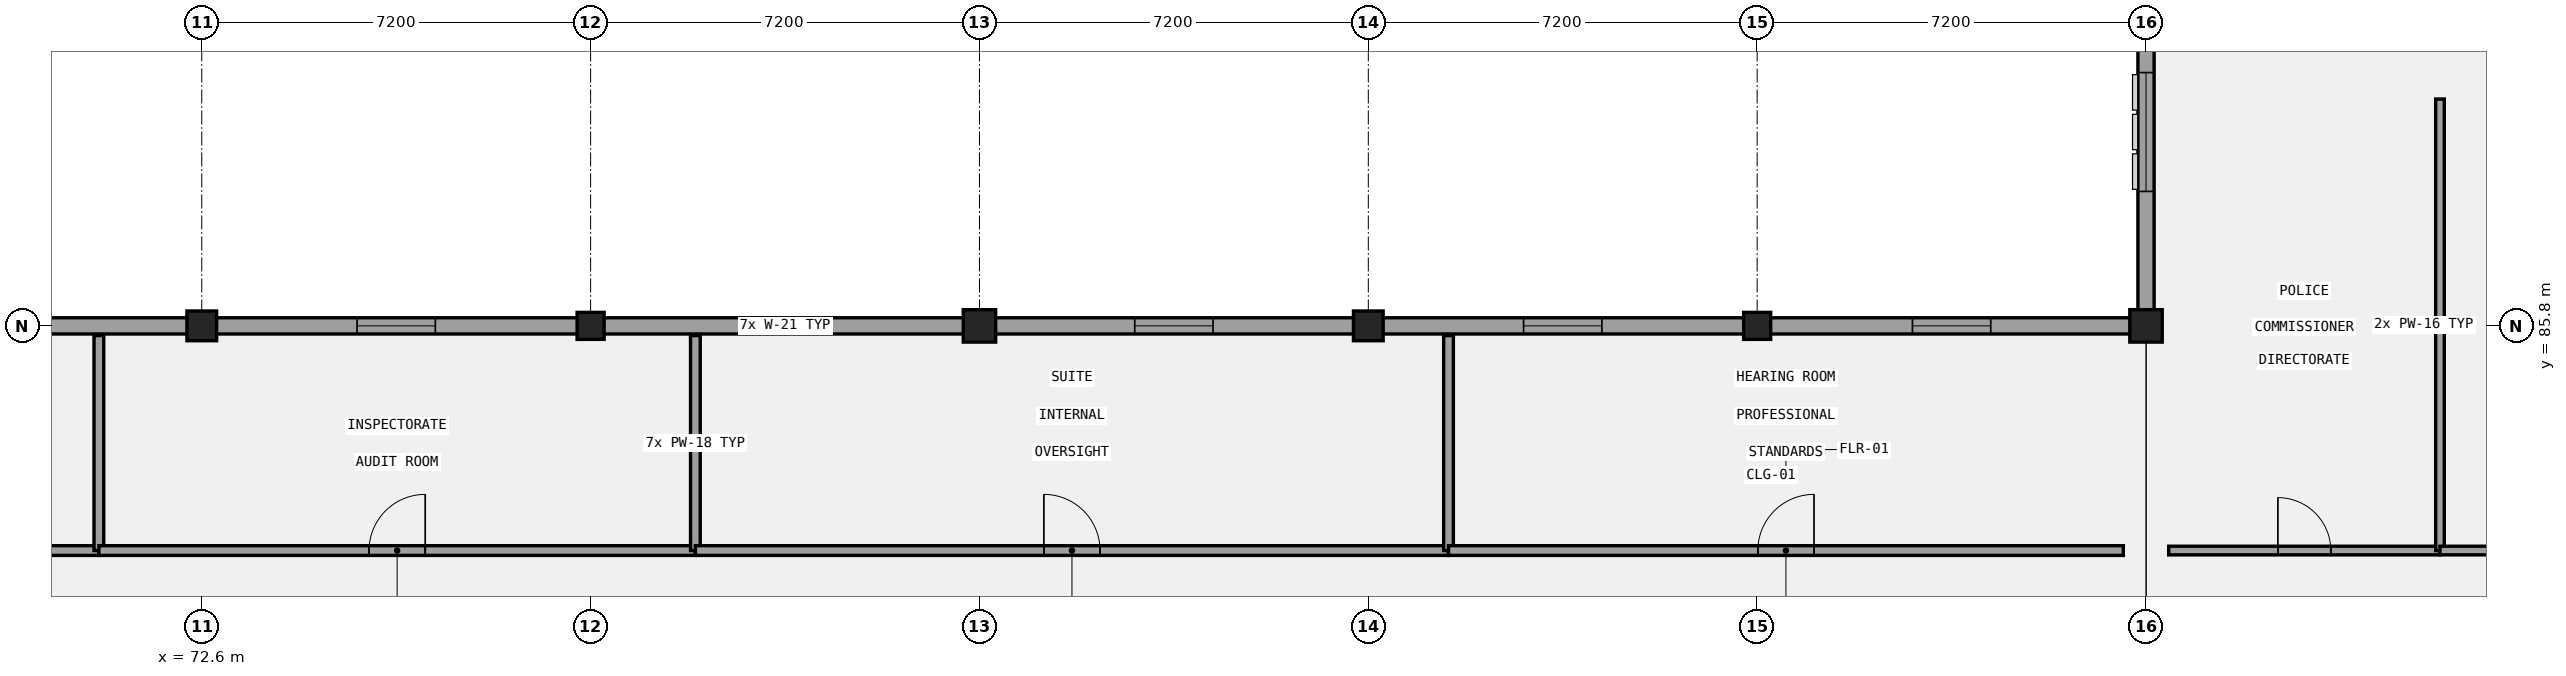
"""IFC4 building model, lengths in metres.
Left out: names, types, materials, properties, quantities, classifications, styles, units other than length and angle.
Written with IfcOpenShell. Run it as: python <this file> out.ifc"""

import sys

from ifc_helpers import new_model, si_unit, direction, frame, frame_2d, origin, origin_2d, place, context, subcontext, project, spatial, rectangle, extrude, element, fill, save


model = new_model("IFC4")
c1 = context("Model", 3, precision=1e-05, world=origin(), true_north=direction((0.0, 1.0)))
c2 = subcontext(c1, "Body", "Model", "MODEL_VIEW")
j1 = project(units=[si_unit("LENGTHUNIT", "METRE"), si_unit("PLANEANGLEUNIT", "RADIAN")], contexts=[c1])
p1 = place(None, origin())
s1 = spatial("IfcSite", under=j1, at=p1, CompositionType="ELEMENT")
p2 = place(p1, origin())
s2 = spatial("IfcBuilding", under=s1, at=p2, CompositionType="ELEMENT")
p3 = place(p2, frame((0.0, 0.0, 22.2)))
s3 = spatial("IfcBuildingStorey", under=s2, at=p3, CompositionType="ELEMENT", Elevation=22.2)
p4 = place(p3, frame((72.6, 85.8, 0.0), z_axis=(0.0, 0.0, 1.0), x_axis=(1.0, 0.0, 0.0)))
e1 = element("IfcColumn", 1, at=p4, inside=s3, PredefinedType="COLUMN", context=c2, shape_type="SweptSolid", body=[
    extrude(rectangle(XDim=0.55, YDim=0.55, at=origin_2d()), origin(), (0.0, 0.0, 1.0), 4.2),
])
p5 = place(p3, frame((79.8, 85.8, 0.0), z_axis=(0.0, 0.0, 1.0), x_axis=(1.0, 0.0, 0.0)))
e2 = element("IfcColumn", 2, at=p5, inside=s3, PredefinedType="COLUMN", context=c2, shape_type="SweptSolid", body=[
    extrude(rectangle(XDim=0.5, YDim=0.5, at=origin_2d()), origin(), (0.0, 0.0, 1.0), 4.2),
])
p6 = place(p3, frame((87.0, 85.8, 0.0), z_axis=(0.0, 0.0, 1.0), x_axis=(1.0, 0.0, 0.0)))
e3 = element("IfcColumn", 3, at=p6, inside=s3, PredefinedType="COLUMN", context=c2, shape_type="SweptSolid", body=[
    extrude(rectangle(XDim=0.6, YDim=0.6, at=origin_2d()), origin(), (0.0, 0.0, 1.0), 4.2),
])
p7 = place(p3, frame((94.2, 85.8, 0.0), z_axis=(0.0, 0.0, 1.0), x_axis=(1.0, 0.0, 0.0)))
e4 = element("IfcColumn", 4, at=p7, inside=s3, PredefinedType="COLUMN", context=c2, shape_type="SweptSolid", body=[
    extrude(rectangle(XDim=0.55, YDim=0.55, at=origin_2d()), origin(), (0.0, 0.0, 1.0), 4.2),
])
p8 = place(p3, frame((101.4, 85.8, 0.0), z_axis=(0.0, 0.0, 1.0), x_axis=(1.0, 0.0, 0.0)))
e5 = element("IfcColumn", 5, at=p8, inside=s3, PredefinedType="COLUMN", context=c2, shape_type="SweptSolid", body=[
    extrude(rectangle(XDim=0.5, YDim=0.5, at=origin_2d()), origin(), (0.0, 0.0, 1.0), 4.2),
])
p9 = place(p3, frame((108.6, 85.8, 0.0), z_axis=(0.0, 0.0, 1.0), x_axis=(1.0, 0.0, 0.0)))
e6 = element("IfcColumn", 6, at=p9, inside=s3, PredefinedType="COLUMN", context=c2, shape_type="SweptSolid", body=[
    extrude(rectangle(XDim=0.6, YDim=0.6, at=origin_2d()), origin(), (0.0, 0.0, 1.0), 4.2),
])
p10 = place(p3, frame((108.6, 92.83, 0.0), z_axis=(0.0, 0.0, 1.0), x_axis=(0.0, -1.0, 0.0)))
e7 = element("IfcWall", 7, at=p10, inside=s3, PredefinedType="SOLIDWALL", context=c2, shape_type="SweptSolid", body=[
    extrude(rectangle(XDim=6.88, YDim=0.3, at=frame_2d((3.44, 0.0))), origin(), (0.0, 0.0, 1.0), 3.32),
])
p11 = place(p10, frame((2.34, 0.0, 0.95)))
e8 = element("IfcOpeningElement", 8, at=p11, cuts=e7, PredefinedType="OPENING", context=c2, shape_type="SweptSolid", body=[
    extrude(rectangle(XDim=2.2, YDim=1.65, at=frame_2d((1.1, 0.825))), frame((0.0, 0.16, 0.0), z_axis=(0.0, -1.0, 0.0), x_axis=(1.0, 0.0, 0.0)), (0.0, 0.0, 1.0), 0.32),
])
p12 = place(p3, frame((108.75, 85.8, 0.0), z_axis=(0.0, 0.0, 1.0), x_axis=(-1.0, 0.0, 0.0)))
e9 = element("IfcWall", 9, at=p12, inside=s3, PredefinedType="SOLIDWALL", context=c2, shape_type="SweptSolid", body=[
    extrude(rectangle(XDim=101.1, YDim=0.3, at=frame_2d((50.55, 0.0))), origin(), (0.0, 0.0, 1.0), 2.92),
])
p13 = place(p12, frame((96.625, 0.0, 1.0)))
e10 = element("IfcOpeningElement", 10, at=p13, cuts=e9, PredefinedType="OPENING", context=c2, shape_type="SweptSolid", body=[
    extrude(rectangle(XDim=1.45, YDim=1.4, at=frame_2d((0.725, 0.7))), frame((0.0, 0.16, 0.0), z_axis=(0.0, -1.0, 0.0), x_axis=(1.0, 0.0, 0.0)), (0.0, 0.0, 1.0), 0.32),
])
p14 = place(p12, frame((89.425, 0.0, 1.0)))
e11 = element("IfcOpeningElement", 11, at=p14, cuts=e9, PredefinedType="OPENING", context=c2, shape_type="SweptSolid", body=[
    extrude(rectangle(XDim=1.45, YDim=1.4, at=frame_2d((0.725, 0.7))), frame((0.0, 0.16, 0.0), z_axis=(0.0, -1.0, 0.0), x_axis=(1.0, 0.0, 0.0)), (0.0, 0.0, 1.0), 0.32),
])
p15 = place(p12, frame((82.225, 0.0, 1.0)))
e12 = element("IfcOpeningElement", 12, at=p15, cuts=e9, PredefinedType="OPENING", context=c2, shape_type="SweptSolid", body=[
    extrude(rectangle(XDim=1.45, YDim=1.4, at=frame_2d((0.725, 0.7))), frame((0.0, 0.16, 0.0), z_axis=(0.0, -1.0, 0.0), x_axis=(1.0, 0.0, 0.0)), (0.0, 0.0, 1.0), 0.32),
])
p16 = place(p12, frame((75.025, 0.0, 1.0)))
e13 = element("IfcOpeningElement", 13, at=p16, cuts=e9, PredefinedType="OPENING", context=c2, shape_type="SweptSolid", body=[
    extrude(rectangle(XDim=1.45, YDim=1.4, at=frame_2d((0.725, 0.7))), frame((0.0, 0.16, 0.0), z_axis=(0.0, -1.0, 0.0), x_axis=(1.0, 0.0, 0.0)), (0.0, 0.0, 1.0), 0.32),
])
p17 = place(p12, frame((67.825, 0.0, 1.0)))
e14 = element("IfcOpeningElement", 14, at=p17, cuts=e9, PredefinedType="OPENING", context=c2, shape_type="SweptSolid", body=[
    extrude(rectangle(XDim=1.45, YDim=1.4, at=frame_2d((0.725, 0.7))), frame((0.0, 0.16, 0.0), z_axis=(0.0, -1.0, 0.0), x_axis=(1.0, 0.0, 0.0)), (0.0, 0.0, 1.0), 0.32),
])
p18 = place(p12, frame((60.625, 0.0, 1.0)))
e15 = element("IfcOpeningElement", 15, at=p18, cuts=e9, PredefinedType="OPENING", context=c2, shape_type="SweptSolid", body=[
    extrude(rectangle(XDim=1.45, YDim=1.4, at=frame_2d((0.725, 0.7))), frame((0.0, 0.16, 0.0), z_axis=(0.0, -1.0, 0.0), x_axis=(1.0, 0.0, 0.0)), (0.0, 0.0, 1.0), 0.32),
])
p19 = place(p12, frame((53.425, 0.0, 1.0)))
e16 = element("IfcOpeningElement", 16, at=p19, cuts=e9, PredefinedType="OPENING", context=c2, shape_type="SweptSolid", body=[
    extrude(rectangle(XDim=1.45, YDim=1.4, at=frame_2d((0.725, 0.7))), frame((0.0, 0.16, 0.0), z_axis=(0.0, -1.0, 0.0), x_axis=(1.0, 0.0, 0.0)), (0.0, 0.0, 1.0), 0.32),
])
p20 = place(p12, frame((46.225, 0.0, 1.0)))
e17 = element("IfcOpeningElement", 17, at=p20, cuts=e9, PredefinedType="OPENING", context=c2, shape_type="SweptSolid", body=[
    extrude(rectangle(XDim=1.45, YDim=1.4, at=frame_2d((0.725, 0.7))), frame((0.0, 0.16, 0.0), z_axis=(0.0, -1.0, 0.0), x_axis=(1.0, 0.0, 0.0)), (0.0, 0.0, 1.0), 0.32),
])
p21 = place(p12, frame((39.025, 0.0, 1.0)))
e18 = element("IfcOpeningElement", 18, at=p21, cuts=e9, PredefinedType="OPENING", context=c2, shape_type="SweptSolid", body=[
    extrude(rectangle(XDim=1.45, YDim=1.4, at=frame_2d((0.725, 0.7))), frame((0.0, 0.16, 0.0), z_axis=(0.0, -1.0, 0.0), x_axis=(1.0, 0.0, 0.0)), (0.0, 0.0, 1.0), 0.32),
])
p22 = place(p12, frame((31.825, 0.0, 1.0)))
e19 = element("IfcOpeningElement", 19, at=p22, cuts=e9, PredefinedType="OPENING", context=c2, shape_type="SweptSolid", body=[
    extrude(rectangle(XDim=1.45, YDim=1.4, at=frame_2d((0.725, 0.7))), frame((0.0, 0.16, 0.0), z_axis=(0.0, -1.0, 0.0), x_axis=(1.0, 0.0, 0.0)), (0.0, 0.0, 1.0), 0.32),
])
p23 = place(p12, frame((24.625, 0.0, 1.0)))
e20 = element("IfcOpeningElement", 20, at=p23, cuts=e9, PredefinedType="OPENING", context=c2, shape_type="SweptSolid", body=[
    extrude(rectangle(XDim=1.45, YDim=1.4, at=frame_2d((0.725, 0.7))), frame((0.0, 0.16, 0.0), z_axis=(0.0, -1.0, 0.0), x_axis=(1.0, 0.0, 0.0)), (0.0, 0.0, 1.0), 0.32),
])
p24 = place(p12, frame((17.425, 0.0, 1.0)))
e21 = element("IfcOpeningElement", 21, at=p24, cuts=e9, PredefinedType="OPENING", context=c2, shape_type="SweptSolid", body=[
    extrude(rectangle(XDim=1.45, YDim=1.4, at=frame_2d((0.725, 0.7))), frame((0.0, 0.16, 0.0), z_axis=(0.0, -1.0, 0.0), x_axis=(1.0, 0.0, 0.0)), (0.0, 0.0, 1.0), 0.32),
])
p25 = place(p12, frame((10.225, 0.0, 1.0)))
e22 = element("IfcOpeningElement", 22, at=p25, cuts=e9, PredefinedType="OPENING", context=c2, shape_type="SweptSolid", body=[
    extrude(rectangle(XDim=1.45, YDim=1.4, at=frame_2d((0.725, 0.7))), frame((0.0, 0.16, 0.0), z_axis=(0.0, -1.0, 0.0), x_axis=(1.0, 0.0, 0.0)), (0.0, 0.0, 1.0), 0.32),
])
p26 = place(p12, frame((3.025, 0.0, 1.0)))
e23 = element("IfcOpeningElement", 23, at=p26, cuts=e9, PredefinedType="OPENING", context=c2, shape_type="SweptSolid", body=[
    extrude(rectangle(XDim=1.45, YDim=1.4, at=frame_2d((0.725, 0.7))), frame((0.0, 0.16, 0.0), z_axis=(0.0, -1.0, 0.0), x_axis=(1.0, 0.0, 0.0)), (0.0, 0.0, 1.0), 0.32),
])
p27 = place(p3, frame((109.02, 81.64, 0.0), z_axis=(0.0, 0.0, 1.0), x_axis=(1.0, 0.0, 0.0)))
e24 = element("IfcWall", 24, at=p27, inside=s3, PredefinedType="PARTITIONING", context=c2, shape_type="SweptSolid", body=[
    extrude(rectangle(XDim=5.023, YDim=0.16, at=frame_2d((2.511, 0.0))), origin(), (0.0, 0.0, 1.0), 3.92),
])
p28 = place(p27, frame((2.021, 0.0, 0.0)))
e25 = element("IfcOpeningElement", 25, at=p28, cuts=e24, PredefinedType="OPENING", context=c2, shape_type="SweptSolid", body=[
    extrude(rectangle(XDim=0.98, YDim=2.35, at=frame_2d((0.49, 1.175))), frame((0.0, 0.09, 0.0), z_axis=(0.0, -1.0, 0.0), x_axis=(1.0, 0.0, 0.0)), (0.0, 0.0, 1.0), 0.18),
])
p29 = place(p3, frame((114.043, 81.64, 0.0), z_axis=(0.0, 0.0, 1.0), x_axis=(0.0, 1.0, 0.0)))
e26 = element("IfcWall", 26, at=p29, inside=s3, PredefinedType="PARTITIONING", context=c2, shape_type="SweptSolid", body=[
    extrude(rectangle(XDim=8.36, YDim=0.16, at=frame_2d((4.18, 0.0))), origin(), (0.0, 0.0, 1.0), 3.92),
])
p30 = place(p3, frame((114.043, 81.64, 0.0), z_axis=(0.0, 0.0, 1.0), x_axis=(1.0, 0.0, 0.0)))
e27 = element("IfcWall", 27, at=p30, inside=s3, PredefinedType="PARTITIONING", context=c2, shape_type="SweptSolid", body=[
    extrude(rectangle(XDim=5.023, YDim=0.16, at=frame_2d((2.511, 0.0))), origin(), (0.0, 0.0, 1.0), 3.92),
])
p31 = place(p30, frame((1.991, 0.0, 0.0)))
e28 = element("IfcOpeningElement", 28, at=p31, cuts=e27, PredefinedType="OPENING", context=c2, shape_type="SweptSolid", body=[
    extrude(rectangle(XDim=1.04, YDim=2.1, at=frame_2d((0.52, 1.05))), frame((0.0, 0.09, 0.0), z_axis=(0.0, -1.0, 0.0), x_axis=(1.0, 0.0, 0.0)), (0.0, 0.0, 1.0), 0.18),
])
p32 = place(p3, frame((58.2, 81.64, 0.0), z_axis=(0.0, 0.0, 1.0), x_axis=(1.0, 0.0, 0.0)))
e29 = element("IfcWall", 29, at=p32, inside=s3, PredefinedType="PARTITIONING", context=c2, shape_type="SweptSolid", body=[
    extrude(rectangle(XDim=12.495, YDim=0.18, at=frame_2d((6.248, 0.0))), origin(), (0.0, 0.0, 1.0), 3.92),
])
p33 = place(p32, frame((5.758, 0.0, 0.0)))
e30 = element("IfcOpeningElement", 30, at=p33, cuts=e29, PredefinedType="OPENING", context=c2, shape_type="SweptSolid", body=[
    extrude(rectangle(XDim=0.98, YDim=2.35, at=frame_2d((0.49, 1.175))), frame((0.0, 0.1, 0.0), z_axis=(0.0, -1.0, 0.0), x_axis=(1.0, 0.0, 0.0)), (0.0, 0.0, 1.0), 0.2),
])
p34 = place(p3, frame((70.695, 81.64, 0.0), z_axis=(0.0, 0.0, 1.0), x_axis=(0.0, 1.0, 0.0)))
e31 = element("IfcWall", 31, at=p34, inside=s3, PredefinedType="PARTITIONING", context=c2, shape_type="SweptSolid", body=[
    extrude(rectangle(XDim=3.98, YDim=0.18, at=frame_2d((1.99, 0.0))), origin(), (0.0, 0.0, 1.0), 3.92),
])
p35 = place(p3, frame((70.695, 81.64, 0.0), z_axis=(0.0, 0.0, 1.0), x_axis=(1.0, 0.0, 0.0)))
e32 = element("IfcWall", 32, at=p35, inside=s3, PredefinedType="PARTITIONING", context=c2, shape_type="SweptSolid", body=[
    extrude(rectangle(XDim=11.045, YDim=0.18, at=frame_2d((5.522, 0.0))), origin(), (0.0, 0.0, 1.0), 3.92),
])
p36 = place(p35, frame((5.002, 0.0, 0.0)))
e33 = element("IfcOpeningElement", 33, at=p36, cuts=e32, PredefinedType="OPENING", context=c2, shape_type="SweptSolid", body=[
    extrude(rectangle(XDim=1.04, YDim=2.1, at=frame_2d((0.52, 1.05))), frame((0.0, 0.1, 0.0), z_axis=(0.0, -1.0, 0.0), x_axis=(1.0, 0.0, 0.0)), (0.0, 0.0, 1.0), 0.2),
])
p37 = place(p3, frame((81.74, 81.64, 0.0), z_axis=(0.0, 0.0, 1.0), x_axis=(0.0, 1.0, 0.0)))
e34 = element("IfcWall", 34, at=p37, inside=s3, PredefinedType="PARTITIONING", context=c2, shape_type="SweptSolid", body=[
    extrude(rectangle(XDim=3.98, YDim=0.18, at=frame_2d((1.99, 0.0))), origin(), (0.0, 0.0, 1.0), 3.92),
])
p38 = place(p3, frame((81.74, 81.64, 0.0), z_axis=(0.0, 0.0, 1.0), x_axis=(1.0, 0.0, 0.0)))
e35 = element("IfcWall", 35, at=p38, inside=s3, PredefinedType="PARTITIONING", context=c2, shape_type="SweptSolid", body=[
    extrude(rectangle(XDim=13.945, YDim=0.18, at=frame_2d((6.973, 0.0))), origin(), (0.0, 0.0, 1.0), 3.92),
])
p39 = place(p38, frame((6.452, 0.0, 0.0)))
e36 = element("IfcOpeningElement", 36, at=p39, cuts=e35, PredefinedType="OPENING", context=c2, shape_type="SweptSolid", body=[
    extrude(rectangle(XDim=1.04, YDim=2.22, at=frame_2d((0.52, 1.11))), frame((0.0, 0.1, 0.0), z_axis=(0.0, -1.0, 0.0), x_axis=(1.0, 0.0, 0.0)), (0.0, 0.0, 1.0), 0.2),
])
p40 = place(p3, frame((95.685, 81.64, 0.0), z_axis=(0.0, 0.0, 1.0), x_axis=(0.0, 1.0, 0.0)))
e37 = element("IfcWall", 37, at=p40, inside=s3, PredefinedType="PARTITIONING", context=c2, shape_type="SweptSolid", body=[
    extrude(rectangle(XDim=3.98, YDim=0.18, at=frame_2d((1.99, 0.0))), origin(), (0.0, 0.0, 1.0), 3.92),
])
p41 = place(p3, frame((95.685, 81.64, 0.0), z_axis=(0.0, 0.0, 1.0), x_axis=(1.0, 0.0, 0.0)))
e38 = element("IfcWall", 38, at=p41, inside=s3, PredefinedType="PARTITIONING", context=c2, shape_type="SweptSolid", body=[
    extrude(rectangle(XDim=12.495, YDim=0.18, at=frame_2d((6.248, 0.0))), origin(), (0.0, 0.0, 1.0), 3.92),
])
p42 = place(p41, frame((5.728, 0.0, 0.0)))
e39 = element("IfcOpeningElement", 39, at=p42, cuts=e38, PredefinedType="OPENING", context=c2, shape_type="SweptSolid", body=[
    extrude(rectangle(XDim=1.04, YDim=2.35, at=frame_2d((0.52, 1.175))), frame((0.0, 0.1, 0.0), z_axis=(0.0, -1.0, 0.0), x_axis=(1.0, 0.0, 0.0)), (0.0, 0.0, 1.0), 0.2),
])
p43 = place(p11, origin())
e40 = element("IfcWindow", 40, at=p43, inside=s3, PartitioningType="SINGLE_PANEL", PredefinedType="WINDOW", context=c2, shape_type="SweptSolid", body=[
    extrude(rectangle(XDim=2.2, YDim=1.65, at=frame_2d((1.1, 0.825))), frame((0.0, 0.03, 0.0), z_axis=(0.0, -1.0, 0.0), x_axis=(1.0, 0.0, 0.0)), (0.0, 0.0, 1.0), 0.06),
])
fill(e8, e40)
p44 = place(p22, origin())
e41 = element("IfcWindow", 41, at=p44, inside=s3, PartitioningType="SINGLE_PANEL", PredefinedType="WINDOW", context=c2, shape_type="SweptSolid", body=[
    extrude(rectangle(XDim=1.45, YDim=1.4, at=frame_2d((0.725, 0.7))), frame((0.0, 0.03, 0.0), z_axis=(0.0, -1.0, 0.0), x_axis=(1.0, 0.0, 0.0)), (0.0, 0.0, 1.0), 0.06),
])
fill(e19, e41)
p45 = place(p23, origin())
e42 = element("IfcWindow", 42, at=p45, inside=s3, PartitioningType="SINGLE_PANEL", PredefinedType="WINDOW", context=c2, shape_type="SweptSolid", body=[
    extrude(rectangle(XDim=1.45, YDim=1.4, at=frame_2d((0.725, 0.7))), frame((0.0, 0.03, 0.0), z_axis=(0.0, -1.0, 0.0), x_axis=(1.0, 0.0, 0.0)), (0.0, 0.0, 1.0), 0.06),
])
fill(e20, e42)
p46 = place(p24, origin())
e43 = element("IfcWindow", 43, at=p46, inside=s3, PartitioningType="SINGLE_PANEL", PredefinedType="WINDOW", context=c2, shape_type="SweptSolid", body=[
    extrude(rectangle(XDim=1.45, YDim=1.4, at=frame_2d((0.725, 0.7))), frame((0.0, 0.03, 0.0), z_axis=(0.0, -1.0, 0.0), x_axis=(1.0, 0.0, 0.0)), (0.0, 0.0, 1.0), 0.06),
])
fill(e21, e43)
p47 = place(p25, origin())
e44 = element("IfcWindow", 44, at=p47, inside=s3, PartitioningType="SINGLE_PANEL", PredefinedType="WINDOW", context=c2, shape_type="SweptSolid", body=[
    extrude(rectangle(XDim=1.45, YDim=1.4, at=frame_2d((0.725, 0.7))), frame((0.0, 0.03, 0.0), z_axis=(0.0, -1.0, 0.0), x_axis=(1.0, 0.0, 0.0)), (0.0, 0.0, 1.0), 0.06),
])
fill(e22, e44)
p48 = place(p26, origin())
e45 = element("IfcWindow", 45, at=p48, inside=s3, PartitioningType="SINGLE_PANEL", PredefinedType="WINDOW", context=c2, shape_type="SweptSolid", body=[
    extrude(rectangle(XDim=1.45, YDim=1.4, at=frame_2d((0.725, 0.7))), frame((0.0, 0.03, 0.0), z_axis=(0.0, -1.0, 0.0), x_axis=(1.0, 0.0, 0.0)), (0.0, 0.0, 1.0), 0.06),
])
fill(e23, e45)
p49 = place(p28, origin())
e46 = element("IfcDoor", 46, at=p49, inside=s3, OperationType="SINGLE_SWING_LEFT", PredefinedType="DOOR", context=c2, shape_type="SweptSolid", body=[
    extrude(rectangle(XDim=0.98, YDim=2.35, at=frame_2d((0.49, 1.175))), frame((0.0, 0.025, 0.0), z_axis=(0.0, -1.0, 0.0), x_axis=(1.0, 0.0, 0.0)), (0.0, 0.0, 1.0), 0.05),
])
fill(e25, e46)
p50 = place(p36, origin())
e47 = element("IfcDoor", 47, at=p50, inside=s3, OperationType="SINGLE_SWING_RIGHT", PredefinedType="DOOR", context=c2, shape_type="SweptSolid", body=[
    extrude(rectangle(XDim=1.04, YDim=2.1, at=frame_2d((0.52, 1.05))), frame((0.0, 0.025, 0.0), z_axis=(0.0, -1.0, 0.0), x_axis=(1.0, 0.0, 0.0)), (0.0, 0.0, 1.0), 0.05),
])
fill(e33, e47)
p51 = place(p39, origin())
e48 = element("IfcDoor", 48, at=p51, inside=s3, OperationType="SINGLE_SWING_LEFT", PredefinedType="DOOR", context=c2, shape_type="SweptSolid", body=[
    extrude(rectangle(XDim=1.04, YDim=2.22, at=frame_2d((0.52, 1.11))), frame((0.0, 0.025, 0.0), z_axis=(0.0, -1.0, 0.0), x_axis=(1.0, 0.0, 0.0)), (0.0, 0.0, 1.0), 0.05),
])
fill(e36, e48)
p52 = place(p42, origin())
e49 = element("IfcDoor", 49, at=p52, inside=s3, OperationType="SINGLE_SWING_RIGHT", PredefinedType="DOOR", context=c2, shape_type="SweptSolid", body=[
    extrude(rectangle(XDim=1.04, YDim=2.35, at=frame_2d((0.52, 1.175))), frame((0.0, 0.025, 0.0), z_axis=(0.0, -1.0, 0.0), x_axis=(1.0, 0.0, 0.0)), (0.0, 0.0, 1.0), 0.05),
])
fill(e39, e49)
save(model, sys.argv[1])
